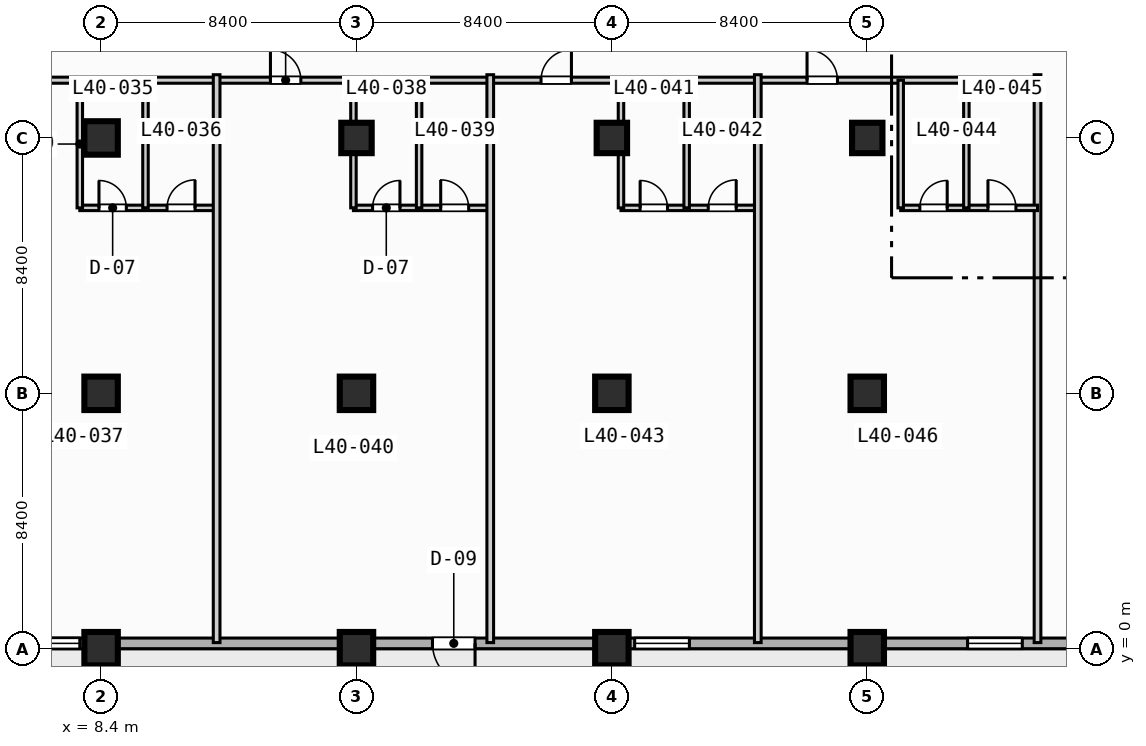
"""IFC4 building model, lengths in metres.
Left out: names, types, materials, properties, quantities, classifications, styles, units other than length and angle.
Written with IfcOpenShell. Run it as: python <this file> out.ifc"""

import sys

from ifc_helpers import new_model, si_unit, direction, frame, frame_2d, origin, origin_2d, place, context, subcontext, project, spatial, rectangle, extrude, element, fill, save


model = new_model("IFC4")
c1 = context("Model", 3, precision=1e-05, world=origin(), true_north=direction((0.0, 1.0)))
c2 = subcontext(c1, "Body", "Model", "MODEL_VIEW")
j1 = project(units=[si_unit("LENGTHUNIT", "METRE"), si_unit("PLANEANGLEUNIT", "RADIAN")], contexts=[c1])
p1 = place(None, origin())
s1 = spatial("IfcSite", under=j1, at=p1, CompositionType="ELEMENT")
p2 = place(p1, origin())
s2 = spatial("IfcBuilding", under=s1, at=p2, CompositionType="ELEMENT")
p3 = place(p2, frame((0.0, 0.0, 168.0)))
s3 = spatial("IfcBuildingStorey", under=s2, at=p3, CompositionType="ELEMENT", Elevation=168.0)
for number, where, z_axis, x_axis in (
    (1, (8.4, 0.0, 0.0), (0.0, 0.0, 1.0), (1.0, 0.0, 0.0)),
    (2, (8.4, 8.4, 0.0), (0.0, 0.0, 1.0), (1.0, 0.0, 0.0)),
    (3, (8.4, 16.8, 0.0), (0.0, 0.0, 1.0), (1.0, 0.0, 0.0)),
    (4, (16.8, 0.0, 0.0), (0.0, 0.0, 1.0), (1.0, 0.0, 0.0)),
    (5, (16.8, 8.4, 0.0), (0.0, 0.0, 1.0), (1.0, 0.0, 0.0)),
):
    element("IfcColumn", number, at=place(p3, frame(where, z_axis=z_axis, x_axis=x_axis)), inside=s3, PredefinedType="COLUMN", context=c2, shape_type="SweptSolid", body=[
        extrude(rectangle(XDim=1.1, YDim=1.1, at=origin_2d()), origin(), (0.0, 0.0, 1.0), 3.7),
    ])
p4 = place(p3, frame((16.8, 16.8, 0.0), z_axis=(0.0, 0.0, 1.0), x_axis=(1.0, 0.0, 0.0)))
e6 = element("IfcColumn", 6, at=p4, inside=s3, PredefinedType="COLUMN", context=c2, shape_type="SweptSolid", body=[
    extrude(rectangle(XDim=1.0, YDim=1.0, at=origin_2d()), origin(), (0.0, 0.0, 1.0), 3.7),
])
for number, where, z_axis, x_axis in (
    (7, (25.2, 0.0, 0.0), (0.0, 0.0, 1.0), (1.0, 0.0, 0.0)),
    (8, (25.2, 8.4, 0.0), (0.0, 0.0, 1.0), (1.0, 0.0, 0.0)),
):
    element("IfcColumn", number, at=place(p3, frame(where, z_axis=z_axis, x_axis=x_axis)), inside=s3, PredefinedType="COLUMN", context=c2, shape_type="SweptSolid", body=[
        extrude(rectangle(XDim=1.1, YDim=1.1, at=origin_2d()), origin(), (0.0, 0.0, 1.0), 3.7),
    ])
p5 = place(p3, frame((25.2, 16.8, 0.0), z_axis=(0.0, 0.0, 1.0), x_axis=(1.0, 0.0, 0.0)))
e9 = element("IfcColumn", 9, at=p5, inside=s3, PredefinedType="COLUMN", context=c2, shape_type="SweptSolid", body=[
    extrude(rectangle(XDim=1.0, YDim=1.0, at=origin_2d()), origin(), (0.0, 0.0, 1.0), 3.7),
])
for number, where, z_axis, x_axis in (
    (10, (33.6, 0.0, 0.0), (0.0, 0.0, 1.0), (1.0, 0.0, 0.0)),
    (11, (33.6, 8.4, 0.0), (0.0, 0.0, 1.0), (1.0, 0.0, 0.0)),
):
    element("IfcColumn", number, at=place(p3, frame(where, z_axis=z_axis, x_axis=x_axis)), inside=s3, PredefinedType="COLUMN", context=c2, shape_type="SweptSolid", body=[
        extrude(rectangle(XDim=1.1, YDim=1.1, at=origin_2d()), origin(), (0.0, 0.0, 1.0), 3.7),
    ])
p6 = place(p3, frame((33.6, 16.8, 0.0), z_axis=(0.0, 0.0, 1.0), x_axis=(1.0, 0.0, 0.0)))
e12 = element("IfcColumn", 12, at=p6, inside=s3, PredefinedType="COLUMN", context=c2, shape_type="SweptSolid", body=[
    extrude(rectangle(XDim=1.0, YDim=1.0, at=origin_2d()), origin(), (0.0, 0.0, 1.0), 3.7),
])
p7 = place(p3, frame((72.425, 0.175, 0.0), z_axis=(0.0, 0.0, 1.0), x_axis=(-1.0, 0.0, 0.0)))
e13 = element("IfcWall", 13, at=p7, inside=s3, PredefinedType="STANDARD", context=c2, shape_type="SweptSolid", body=[
    extrude(rectangle(XDim=69.25, YDim=0.35, at=frame_2d((34.625, 0.0))), origin(), (0.0, 0.0, 1.0), 3.47),
])
p8 = place(p7, frame((51.725, 0.0, 0.0)))
e14 = element("IfcOpeningElement", 14, at=p8, cuts=e13, PredefinedType="OPENING", context=c2, shape_type="SweptSolid", body=[
    extrude(rectangle(XDim=1.4, YDim=2.2, at=frame_2d((0.7, 1.1))), frame((0.0, 0.185, 0.0), z_axis=(0.0, -1.0, 0.0), x_axis=(1.0, 0.0, 0.0)), (0.0, 0.0, 1.0), 0.37),
])
p9 = place(p7, frame((33.725, 0.0, 0.85)))
e15 = element("IfcOpeningElement", 15, at=p9, cuts=e13, PredefinedType="OPENING", context=c2, shape_type="SweptSolid", body=[
    extrude(rectangle(XDim=1.8, YDim=1.8, at=frame_2d((0.9, 0.9))), frame((0.0, 0.185, 0.0), z_axis=(0.0, -1.0, 0.0), x_axis=(1.0, 0.0, 0.0)), (0.0, 0.0, 1.0), 0.37),
])
p10 = place(p7, frame((25.025, 0.0, 0.85)))
e16 = element("IfcOpeningElement", 16, at=p10, cuts=e13, PredefinedType="OPENING", context=c2, shape_type="SweptSolid", body=[
    extrude(rectangle(XDim=2.4, YDim=1.95, at=frame_2d((1.2, 0.975))), frame((0.0, 0.185, 0.0), z_axis=(0.0, -1.0, 0.0), x_axis=(1.0, 0.0, 0.0)), (0.0, 0.0, 1.0), 0.37),
])
p11 = place(p7, frame((8.225, 0.0, 0.85)))
e17 = element("IfcOpeningElement", 17, at=p11, cuts=e13, PredefinedType="OPENING", context=c2, shape_type="SweptSolid", body=[
    extrude(rectangle(XDim=2.4, YDim=1.95, at=frame_2d((1.2, 0.975))), frame((0.0, 0.185, 0.0), z_axis=(0.0, -1.0, 0.0), x_axis=(1.0, 0.0, 0.0)), (0.0, 0.0, 1.0), 0.37),
])
p12 = place(p7, frame((64.725, 0.0, 0.85)))
e18 = element("IfcOpeningElement", 18, at=p12, cuts=e13, PredefinedType="OPENING", context=c2, shape_type="SweptSolid", body=[
    extrude(rectangle(XDim=1.8, YDim=1.8, at=frame_2d((0.9, 0.9))), frame((0.0, 0.185, 0.0), z_axis=(0.0, -1.0, 0.0), x_axis=(1.0, 0.0, 0.0)), (0.0, 0.0, 1.0), 0.37),
])
p13 = place(p7, frame((44.675, 0.0, 0.85)))
e19 = element("IfcOpeningElement", 19, at=p13, cuts=e13, PredefinedType="OPENING", context=c2, shape_type="SweptSolid", body=[
    extrude(rectangle(XDim=1.8, YDim=1.8, at=frame_2d((0.9, 0.9))), frame((0.0, 0.185, 0.0), z_axis=(0.0, -1.0, 0.0), x_axis=(1.0, 0.0, 0.0)), (0.0, 0.0, 1.0), 0.37),
])
p14 = place(p3, frame((3.4, 18.7, 0.0), z_axis=(0.0, 0.0, 1.0), x_axis=(1.0, 0.0, 0.0)))
e20 = element("IfcWall", 20, at=p14, inside=s3, PredefinedType="PARTITIONING", context=c2, shape_type="SweptSolid", body=[
    extrude(rectangle(XDim=35.8, YDim=0.2, at=frame_2d((17.9, 0.0))), origin(), (0.0, 0.0, 1.0), 3.47),
])
p15 = place(p14, frame((1.67, 0.0, 0.0)))
e21 = element("IfcOpeningElement", 21, at=p15, cuts=e20, PredefinedType="OPENING", context=c2, shape_type="SweptSolid", body=[
    extrude(rectangle(XDim=1.0, YDim=2.15, at=frame_2d((0.5, 1.075))), frame((0.0, 0.11, 0.0), z_axis=(0.0, -1.0, 0.0), x_axis=(1.0, 0.0, 0.0)), (0.0, 0.0, 1.0), 0.22),
])
p16 = place(p14, frame((10.57, 0.0, 0.0)))
e22 = element("IfcOpeningElement", 22, at=p16, cuts=e20, PredefinedType="OPENING", context=c2, shape_type="SweptSolid", body=[
    extrude(rectangle(XDim=1.0, YDim=2.15, at=frame_2d((0.5, 1.075))), frame((0.0, 0.11, 0.0), z_axis=(0.0, -1.0, 0.0), x_axis=(1.0, 0.0, 0.0)), (0.0, 0.0, 1.0), 0.22),
])
p17 = place(p14, frame((19.47, 0.0, 0.0)))
e23 = element("IfcOpeningElement", 23, at=p17, cuts=e20, PredefinedType="OPENING", context=c2, shape_type="SweptSolid", body=[
    extrude(rectangle(XDim=1.0, YDim=2.15, at=frame_2d((0.5, 1.075))), frame((0.0, 0.11, 0.0), z_axis=(0.0, -1.0, 0.0), x_axis=(1.0, 0.0, 0.0)), (0.0, 0.0, 1.0), 0.22),
])
p18 = place(p14, frame((28.22, 0.0, 0.0)))
e24 = element("IfcOpeningElement", 24, at=p18, cuts=e20, PredefinedType="OPENING", context=c2, shape_type="SweptSolid", body=[
    extrude(rectangle(XDim=1.0, YDim=2.15, at=frame_2d((0.5, 1.075))), frame((0.0, 0.11, 0.0), z_axis=(0.0, -1.0, 0.0), x_axis=(1.0, 0.0, 0.0)), (0.0, 0.0, 1.0), 0.22),
])
p19 = place(p3, frame((7.7, 14.5, 0.0), z_axis=(0.0, 0.0, 1.0), x_axis=(1.0, 0.0, 0.0)))
e25 = element("IfcWall", 25, at=p19, inside=s3, PredefinedType="PLUMBINGWALL", context=c2, shape_type="SweptSolid", body=[
    extrude(rectangle(XDim=4.5, YDim=0.18, at=frame_2d((2.25, 0.0))), origin(), (0.0, 0.0, 1.0), 3.47),
])
p20 = place(p19, frame((0.63, 0.0, 0.0)))
e26 = element("IfcOpeningElement", 26, at=p20, cuts=e25, PredefinedType="OPENING", context=c2, shape_type="SweptSolid", body=[
    extrude(rectangle(XDim=0.9, YDim=2.1, at=frame_2d((0.45, 1.05))), frame((0.0, 0.1, 0.0), z_axis=(0.0, -1.0, 0.0), x_axis=(1.0, 0.0, 0.0)), (0.0, 0.0, 1.0), 0.2),
])
p21 = place(p19, frame((2.87, 0.0, 0.0)))
e27 = element("IfcOpeningElement", 27, at=p21, cuts=e25, PredefinedType="OPENING", context=c2, shape_type="SweptSolid", body=[
    extrude(rectangle(XDim=0.92, YDim=2.1, at=frame_2d((0.46, 1.05))), frame((0.0, 0.1, 0.0), z_axis=(0.0, -1.0, 0.0), x_axis=(1.0, 0.0, 0.0)), (0.0, 0.0, 1.0), 0.2),
])
for number, where, z_axis, x_axis in (
    (28, (7.7, 14.5, 0.0), (0.0, 0.0, 1.0), (0.0, 1.0, 0.0)),
    (29, (9.86, 14.5, 0.0), (0.0, 0.0, 1.0), (0.0, 1.0, 0.0)),
):
    element("IfcWall", number, at=place(p3, frame(where, z_axis=z_axis, x_axis=x_axis)), inside=s3, PredefinedType="PLUMBINGWALL", context=c2, shape_type="SweptSolid", body=[
        extrude(rectangle(XDim=4.2, YDim=0.18, at=frame_2d((2.1, 0.0))), origin(), (0.0, 0.0, 1.0), 3.47),
    ])
p22 = place(p3, frame((12.2, 0.2, 0.0), z_axis=(0.0, 0.0, 1.0), x_axis=(0.0, 1.0, 0.0)))
e30 = element("IfcWall", 30, at=p22, inside=s3, PredefinedType="PARTITIONING", context=c2, shape_type="SweptSolid", body=[
    extrude(rectangle(XDim=18.68, YDim=0.22, at=frame_2d((9.34, 0.0))), origin(), (0.0, 0.0, 1.0), 3.47),
])
p23 = place(p3, frame((16.7, 14.5, 0.0), z_axis=(0.0, 0.0, 1.0), x_axis=(1.0, 0.0, 0.0)))
e31 = element("IfcWall", 31, at=p23, inside=s3, PredefinedType="PLUMBINGWALL", context=c2, shape_type="SweptSolid", body=[
    extrude(rectangle(XDim=4.5, YDim=0.18, at=frame_2d((2.25, 0.0))), origin(), (0.0, 0.0, 1.0), 3.47),
])
p24 = place(p23, frame((0.63, 0.0, 0.0)))
e32 = element("IfcOpeningElement", 32, at=p24, cuts=e31, PredefinedType="OPENING", context=c2, shape_type="SweptSolid", body=[
    extrude(rectangle(XDim=0.9, YDim=2.1, at=frame_2d((0.45, 1.05))), frame((0.0, 0.1, 0.0), z_axis=(0.0, -1.0, 0.0), x_axis=(1.0, 0.0, 0.0)), (0.0, 0.0, 1.0), 0.2),
])
p25 = place(p23, frame((2.87, 0.0, 0.0)))
e33 = element("IfcOpeningElement", 33, at=p25, cuts=e31, PredefinedType="OPENING", context=c2, shape_type="SweptSolid", body=[
    extrude(rectangle(XDim=0.92, YDim=2.1, at=frame_2d((0.46, 1.05))), frame((0.0, 0.1, 0.0), z_axis=(0.0, -1.0, 0.0), x_axis=(1.0, 0.0, 0.0)), (0.0, 0.0, 1.0), 0.2),
])
p26 = place(p3, frame((16.7, 14.5, 0.0), z_axis=(0.0, 0.0, 1.0), x_axis=(0.0, 1.0, 0.0)))
e34 = element("IfcWall", 34, at=p26, inside=s3, PredefinedType="PLUMBINGWALL", context=c2, shape_type="SweptSolid", body=[
    extrude(rectangle(XDim=4.2, YDim=0.18, at=frame_2d((2.1, 0.0))), origin(), (0.0, 0.0, 1.0), 2.82),
])
p27 = place(p3, frame((18.86, 14.5, 0.0), z_axis=(0.0, 0.0, 1.0), x_axis=(0.0, 1.0, 0.0)))
e35 = element("IfcWall", 35, at=p27, inside=s3, PredefinedType="PLUMBINGWALL", context=c2, shape_type="SweptSolid", body=[
    extrude(rectangle(XDim=4.2, YDim=0.18, at=frame_2d((2.1, 0.0))), origin(), (0.0, 0.0, 1.0), 3.47),
])
p28 = place(p3, frame((21.2, 0.2, 0.0), z_axis=(0.0, 0.0, 1.0), x_axis=(0.0, 1.0, 0.0)))
e36 = element("IfcWall", 36, at=p28, inside=s3, PredefinedType="PARTITIONING", context=c2, shape_type="SweptSolid", body=[
    extrude(rectangle(XDim=18.68, YDim=0.22, at=frame_2d((9.34, 0.0))), origin(), (0.0, 0.0, 1.0), 3.47),
])
p29 = place(p3, frame((25.5, 14.5, 0.0), z_axis=(0.0, 0.0, 1.0), x_axis=(1.0, 0.0, 0.0)))
e37 = element("IfcWall", 37, at=p29, inside=s3, PredefinedType="PLUMBINGWALL", context=c2, shape_type="SweptSolid", body=[
    extrude(rectangle(XDim=4.5, YDim=0.18, at=frame_2d((2.25, 0.0))), origin(), (0.0, 0.0, 1.0), 3.47),
])
p30 = place(p29, frame((0.63, 0.0, 0.0)))
e38 = element("IfcOpeningElement", 38, at=p30, cuts=e37, PredefinedType="OPENING", context=c2, shape_type="SweptSolid", body=[
    extrude(rectangle(XDim=0.9, YDim=2.1, at=frame_2d((0.45, 1.05))), frame((0.0, 0.1, 0.0), z_axis=(0.0, -1.0, 0.0), x_axis=(1.0, 0.0, 0.0)), (0.0, 0.0, 1.0), 0.2),
])
p31 = place(p29, frame((2.87, 0.0, 0.0)))
e39 = element("IfcOpeningElement", 39, at=p31, cuts=e37, PredefinedType="OPENING", context=c2, shape_type="SweptSolid", body=[
    extrude(rectangle(XDim=0.92, YDim=2.1, at=frame_2d((0.46, 1.05))), frame((0.0, 0.1, 0.0), z_axis=(0.0, -1.0, 0.0), x_axis=(1.0, 0.0, 0.0)), (0.0, 0.0, 1.0), 0.2),
])
p32 = place(p3, frame((25.5, 14.5, 0.0), z_axis=(0.0, 0.0, 1.0), x_axis=(0.0, 1.0, 0.0)))
e40 = element("IfcWall", 40, at=p32, inside=s3, PredefinedType="PLUMBINGWALL", context=c2, shape_type="SweptSolid", body=[
    extrude(rectangle(XDim=4.2, YDim=0.18, at=frame_2d((2.1, 0.0))), origin(), (0.0, 0.0, 1.0), 2.82),
])
p33 = place(p3, frame((27.66, 14.5, 0.0), z_axis=(0.0, 0.0, 1.0), x_axis=(0.0, 1.0, 0.0)))
e41 = element("IfcWall", 41, at=p33, inside=s3, PredefinedType="PLUMBINGWALL", context=c2, shape_type="SweptSolid", body=[
    extrude(rectangle(XDim=4.2, YDim=0.18, at=frame_2d((2.1, 0.0))), origin(), (0.0, 0.0, 1.0), 3.47),
])
for number, where, z_axis, x_axis in (
    (42, (30.0, 0.2, 0.0), (0.0, 0.0, 1.0), (0.0, 1.0, 0.0)),
    (43, (39.2, 0.2, 0.0), (0.0, 0.0, 1.0), (0.0, 1.0, 0.0)),
):
    element("IfcWall", number, at=place(p3, frame(where, z_axis=z_axis, x_axis=x_axis)), inside=s3, PredefinedType="PARTITIONING", context=c2, shape_type="SweptSolid", body=[
        extrude(rectangle(XDim=18.68, YDim=0.22, at=frame_2d((9.34, 0.0))), origin(), (0.0, 0.0, 1.0), 3.47),
    ])
p34 = place(p3, frame((34.7, 14.5, 0.0), z_axis=(0.0, 0.0, 1.0), x_axis=(1.0, 0.0, 0.0)))
e44 = element("IfcWall", 44, at=p34, inside=s3, PredefinedType="PLUMBINGWALL", context=c2, shape_type="SweptSolid", body=[
    extrude(rectangle(XDim=4.5, YDim=0.18, at=frame_2d((2.25, 0.0))), origin(), (0.0, 0.0, 1.0), 3.47),
])
p35 = place(p34, frame((0.63, 0.0, 0.0)))
e45 = element("IfcOpeningElement", 45, at=p35, cuts=e44, PredefinedType="OPENING", context=c2, shape_type="SweptSolid", body=[
    extrude(rectangle(XDim=0.9, YDim=2.1, at=frame_2d((0.45, 1.05))), frame((0.0, 0.1, 0.0), z_axis=(0.0, -1.0, 0.0), x_axis=(1.0, 0.0, 0.0)), (0.0, 0.0, 1.0), 0.2),
])
p36 = place(p34, frame((2.87, 0.0, 0.0)))
e46 = element("IfcOpeningElement", 46, at=p36, cuts=e44, PredefinedType="OPENING", context=c2, shape_type="SweptSolid", body=[
    extrude(rectangle(XDim=0.92, YDim=2.1, at=frame_2d((0.46, 1.05))), frame((0.0, 0.1, 0.0), z_axis=(0.0, -1.0, 0.0), x_axis=(1.0, 0.0, 0.0)), (0.0, 0.0, 1.0), 0.2),
])
for number, where, z_axis, x_axis in (
    (47, (34.7, 14.5, 0.0), (0.0, 0.0, 1.0), (0.0, 1.0, 0.0)),
    (48, (36.86, 14.5, 0.0), (0.0, 0.0, 1.0), (0.0, 1.0, 0.0)),
):
    element("IfcWall", number, at=place(p3, frame(where, z_axis=z_axis, x_axis=x_axis)), inside=s3, PredefinedType="PLUMBINGWALL", context=c2, shape_type="SweptSolid", body=[
        extrude(rectangle(XDim=4.2, YDim=0.18, at=frame_2d((2.1, 0.0))), origin(), (0.0, 0.0, 1.0), 3.47),
    ])
p37 = place(p8, origin())
e49 = element("IfcDoor", 49, at=p37, inside=s3, OperationType="SINGLE_SWING_LEFT", PredefinedType="DOOR", context=c2, shape_type="SweptSolid", body=[
    extrude(rectangle(XDim=1.4, YDim=2.2, at=frame_2d((0.7, 1.1))), frame((0.0, 0.025, 0.0), z_axis=(0.0, -1.0, 0.0), x_axis=(1.0, 0.0, 0.0)), (0.0, 0.0, 1.0), 0.05),
])
fill(e14, e49)
p38 = place(p9, origin())
e50 = element("IfcWindow", 50, at=p38, inside=s3, PartitioningType="SINGLE_PANEL", PredefinedType="WINDOW", context=c2, shape_type="SweptSolid", body=[
    extrude(rectangle(XDim=1.8, YDim=1.8, at=frame_2d((0.9, 0.9))), frame((0.0, 0.03, 0.0), z_axis=(0.0, -1.0, 0.0), x_axis=(1.0, 0.0, 0.0)), (0.0, 0.0, 1.0), 0.06),
])
fill(e15, e50)
p39 = place(p12, origin())
e51 = element("IfcWindow", 51, at=p39, inside=s3, PartitioningType="SINGLE_PANEL", PredefinedType="WINDOW", context=c2, shape_type="SweptSolid", body=[
    extrude(rectangle(XDim=1.8, YDim=1.8, at=frame_2d((0.9, 0.9))), frame((0.0, 0.03, 0.0), z_axis=(0.0, -1.0, 0.0), x_axis=(1.0, 0.0, 0.0)), (0.0, 0.0, 1.0), 0.06),
])
fill(e18, e51)
p40 = place(p13, origin())
e52 = element("IfcWindow", 52, at=p40, inside=s3, PartitioningType="SINGLE_PANEL", PredefinedType="WINDOW", context=c2, shape_type="SweptSolid", body=[
    extrude(rectangle(XDim=1.8, YDim=1.8, at=frame_2d((0.9, 0.9))), frame((0.0, 0.03, 0.0), z_axis=(0.0, -1.0, 0.0), x_axis=(1.0, 0.0, 0.0)), (0.0, 0.0, 1.0), 0.06),
])
fill(e19, e52)
p41 = place(p16, origin())
e53 = element("IfcDoor", 53, at=p41, inside=s3, OperationType="SINGLE_SWING_LEFT", PredefinedType="DOOR", context=c2, shape_type="SweptSolid", body=[
    extrude(rectangle(XDim=1.0, YDim=2.15, at=frame_2d((0.5, 1.075))), frame((0.0, 0.025, 0.0), z_axis=(0.0, -1.0, 0.0), x_axis=(1.0, 0.0, 0.0)), (0.0, 0.0, 1.0), 0.05),
])
fill(e22, e53)
p42 = place(p17, origin())
e54 = element("IfcDoor", 54, at=p42, inside=s3, OperationType="SINGLE_SWING_RIGHT", PredefinedType="DOOR", context=c2, shape_type="SweptSolid", body=[
    extrude(rectangle(XDim=1.0, YDim=2.15, at=frame_2d((0.5, 1.075))), frame((0.0, 0.025, 0.0), z_axis=(0.0, -1.0, 0.0), x_axis=(1.0, 0.0, 0.0)), (0.0, 0.0, 1.0), 0.05),
])
fill(e23, e54)
p43 = place(p18, origin())
e55 = element("IfcDoor", 55, at=p43, inside=s3, OperationType="SINGLE_SWING_LEFT", PredefinedType="DOOR", context=c2, shape_type="SweptSolid", body=[
    extrude(rectangle(XDim=1.0, YDim=2.15, at=frame_2d((0.5, 1.075))), frame((0.0, 0.025, 0.0), z_axis=(0.0, -1.0, 0.0), x_axis=(1.0, 0.0, 0.0)), (0.0, 0.0, 1.0), 0.05),
])
fill(e24, e55)
p44 = place(p20, origin())
e56 = element("IfcDoor", 56, at=p44, inside=s3, OperationType="SINGLE_SWING_LEFT", PredefinedType="DOOR", context=c2, shape_type="SweptSolid", body=[
    extrude(rectangle(XDim=0.9, YDim=2.1, at=frame_2d((0.45, 1.05))), frame((0.0, 0.025, 0.0), z_axis=(0.0, -1.0, 0.0), x_axis=(1.0, 0.0, 0.0)), (0.0, 0.0, 1.0), 0.05),
])
fill(e26, e56)
p45 = place(p21, origin())
e57 = element("IfcDoor", 57, at=p45, inside=s3, OperationType="SINGLE_SWING_RIGHT", PredefinedType="DOOR", context=c2, shape_type="SweptSolid", body=[
    extrude(rectangle(XDim=0.92, YDim=2.1, at=frame_2d((0.46, 1.05))), frame((0.0, 0.025, 0.0), z_axis=(0.0, -1.0, 0.0), x_axis=(1.0, 0.0, 0.0)), (0.0, 0.0, 1.0), 0.05),
])
fill(e27, e57)
p46 = place(p24, origin())
e58 = element("IfcDoor", 58, at=p46, inside=s3, OperationType="SINGLE_SWING_RIGHT", PredefinedType="DOOR", context=c2, shape_type="SweptSolid", body=[
    extrude(rectangle(XDim=0.9, YDim=2.1, at=frame_2d((0.45, 1.05))), frame((0.0, 0.025, 0.0), z_axis=(0.0, -1.0, 0.0), x_axis=(1.0, 0.0, 0.0)), (0.0, 0.0, 1.0), 0.05),
])
fill(e32, e58)
p47 = place(p25, origin())
e59 = element("IfcDoor", 59, at=p47, inside=s3, OperationType="SINGLE_SWING_LEFT", PredefinedType="DOOR", context=c2, shape_type="SweptSolid", body=[
    extrude(rectangle(XDim=0.92, YDim=2.1, at=frame_2d((0.46, 1.05))), frame((0.0, 0.025, 0.0), z_axis=(0.0, -1.0, 0.0), x_axis=(1.0, 0.0, 0.0)), (0.0, 0.0, 1.0), 0.05),
])
fill(e33, e59)
p48 = place(p30, origin())
e60 = element("IfcDoor", 60, at=p48, inside=s3, OperationType="SINGLE_SWING_LEFT", PredefinedType="DOOR", context=c2, shape_type="SweptSolid", body=[
    extrude(rectangle(XDim=0.9, YDim=2.1, at=frame_2d((0.45, 1.05))), frame((0.0, 0.025, 0.0), z_axis=(0.0, -1.0, 0.0), x_axis=(1.0, 0.0, 0.0)), (0.0, 0.0, 1.0), 0.05),
])
fill(e38, e60)
p49 = place(p31, origin())
e61 = element("IfcDoor", 61, at=p49, inside=s3, OperationType="SINGLE_SWING_RIGHT", PredefinedType="DOOR", context=c2, shape_type="SweptSolid", body=[
    extrude(rectangle(XDim=0.92, YDim=2.1, at=frame_2d((0.46, 1.05))), frame((0.0, 0.025, 0.0), z_axis=(0.0, -1.0, 0.0), x_axis=(1.0, 0.0, 0.0)), (0.0, 0.0, 1.0), 0.05),
])
fill(e39, e61)
p50 = place(p35, origin())
e62 = element("IfcDoor", 62, at=p50, inside=s3, OperationType="SINGLE_SWING_RIGHT", PredefinedType="DOOR", context=c2, shape_type="SweptSolid", body=[
    extrude(rectangle(XDim=0.9, YDim=2.1, at=frame_2d((0.45, 1.05))), frame((0.0, 0.025, 0.0), z_axis=(0.0, -1.0, 0.0), x_axis=(1.0, 0.0, 0.0)), (0.0, 0.0, 1.0), 0.05),
])
fill(e45, e62)
p51 = place(p36, origin())
e63 = element("IfcDoor", 63, at=p51, inside=s3, OperationType="SINGLE_SWING_LEFT", PredefinedType="DOOR", context=c2, shape_type="SweptSolid", body=[
    extrude(rectangle(XDim=0.92, YDim=2.1, at=frame_2d((0.46, 1.05))), frame((0.0, 0.025, 0.0), z_axis=(0.0, -1.0, 0.0), x_axis=(1.0, 0.0, 0.0)), (0.0, 0.0, 1.0), 0.05),
])
fill(e46, e63)
save(model, sys.argv[1])
